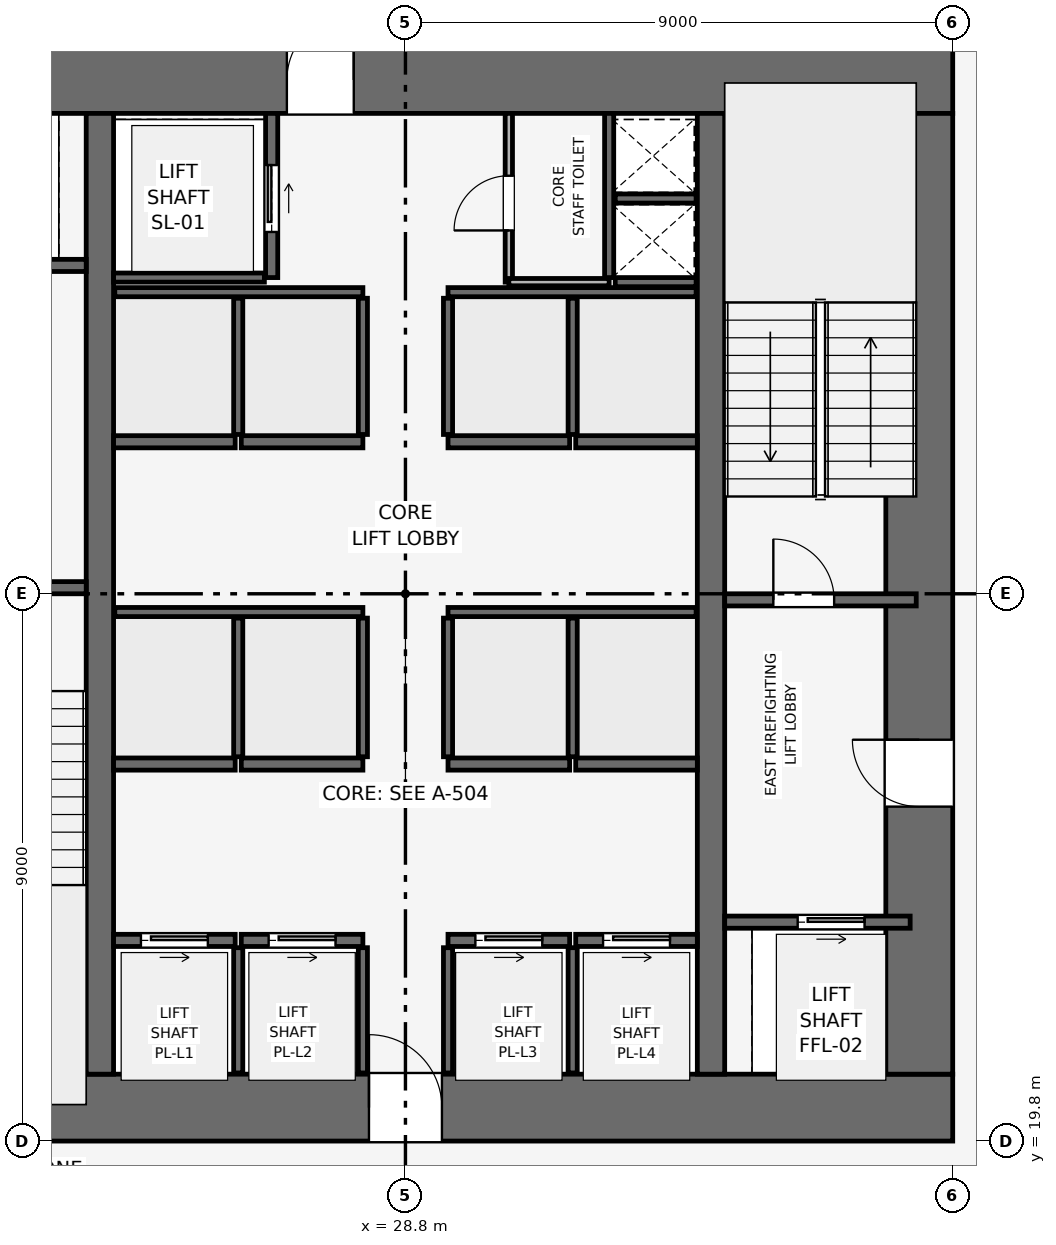
"""IFC4 building model, lengths in metres.
Left out: names, types, materials, properties, quantities, classifications, styles, units other than length and angle.
Written with IfcOpenShell. Run it as: python <this file> out.ifc"""

import sys

from ifc_helpers import new_model, si_unit, direction, frame, frame_2d, origin, place, context, subcontext, project, spatial, rectangle, extrude, element, fill, save


model = new_model("IFC4")
c1 = context("Model", 3, precision=1e-05, world=origin(), true_north=direction((0.0, 1.0)))
c2 = subcontext(c1, "Body", "Model", "MODEL_VIEW")
j1 = project(units=[si_unit("LENGTHUNIT", "METRE"), si_unit("PLANEANGLEUNIT", "RADIAN")], contexts=[c1])
p1 = place(None, origin())
s1 = spatial("IfcSite", under=j1, at=p1, CompositionType="ELEMENT")
p2 = place(p1, origin())
s2 = spatial("IfcBuilding", under=s1, at=p2, CompositionType="ELEMENT")
p3 = place(p2, frame((0.0, 0.0, 30.0)))
s3 = spatial("IfcBuildingStorey", under=s2, at=p3, CompositionType="ELEMENT", Elevation=30.0)
p4 = place(p3, frame((19.8, 20.35, 0.0), z_axis=(0.0, 0.0, 1.0), x_axis=(1.0, 0.0, 0.0)))
e1 = element("IfcWall", 1, at=p4, inside=s3, PredefinedType="SHEAR", context=c2, shape_type="SweptSolid", body=[
    extrude(rectangle(XDim=18.0, YDim=1.1, at=frame_2d((9.0, 0.0))), origin(), (0.0, 0.0, 1.0), 3.9),
])
p5 = place(p4, frame((8.4, 0.0, 0.0)))
e2 = element("IfcOpeningElement", 2, at=p5, cuts=e1, PredefinedType="OPENING", context=c2, shape_type="SweptSolid", body=[
    extrude(rectangle(XDim=1.2, YDim=2.2, at=frame_2d((0.6, 1.1))), frame((0.0, 0.56, 0.0), z_axis=(0.0, -1.0, 0.0), x_axis=(1.0, 0.0, 0.0)), (0.0, 0.0, 1.0), 1.12),
])
p6 = place(p3, frame((19.8, 37.25, 0.0), z_axis=(0.0, 0.0, 1.0), x_axis=(1.0, 0.0, 0.0)))
e3 = element("IfcWall", 3, at=p6, inside=s3, PredefinedType="SHEAR", context=c2, shape_type="SweptSolid", body=[
    extrude(rectangle(XDim=18.0, YDim=1.1, at=frame_2d((9.0, 0.0))), origin(), (0.0, 0.0, 1.0), 3.9),
])
p7 = place(p6, frame((7.05, 0.0, 0.0)))
e4 = element("IfcOpeningElement", 4, at=p7, cuts=e3, PredefinedType="OPENING", context=c2, shape_type="SweptSolid", body=[
    extrude(rectangle(XDim=1.1, YDim=2.15, at=frame_2d((0.55, 1.075))), frame((0.0, 0.56, 0.0), z_axis=(0.0, -1.0, 0.0), x_axis=(1.0, 0.0, 0.0)), (0.0, 0.0, 1.0), 1.12),
])
p8 = place(p3, frame((37.25, 20.9, 0.0), z_axis=(0.0, 0.0, 1.0), x_axis=(0.0, 1.0, 0.0)))
e5 = element("IfcWall", 5, at=p8, inside=s3, PredefinedType="SHEAR", context=c2, shape_type="SweptSolid", body=[
    extrude(rectangle(XDim=15.8, YDim=1.1, at=frame_2d((7.9, 0.0))), origin(), (0.0, 0.0, 1.0), 3.9),
])
p9 = place(p8, frame((4.4, 0.0, 0.0)))
e6 = element("IfcOpeningElement", 6, at=p9, cuts=e5, PredefinedType="OPENING", context=c2, shape_type="SweptSolid", body=[
    extrude(rectangle(XDim=1.1, YDim=2.15, at=frame_2d((0.55, 1.075))), frame((0.0, 0.56, 0.0), z_axis=(0.0, -1.0, 0.0), x_axis=(1.0, 0.0, 0.0)), (0.0, 0.0, 1.0), 1.12),
])
for number, where, z_axis, x_axis in (
    (7, (23.775, 20.9, 0.0), (0.0, 0.0, 1.0), (0.0, 1.0, 0.0)),
    (8, (33.825, 20.9, 0.0), (0.0, 0.0, 1.0), (0.0, 1.0, 0.0)),
):
    element("IfcWall", number, at=place(p3, frame(where, z_axis=z_axis, x_axis=x_axis)), inside=s3, PredefinedType="SHEAR", context=c2, shape_type="SweptSolid", body=[
        extrude(rectangle(XDim=15.8, YDim=0.45, at=frame_2d((7.9, 0.0))), origin(), (0.0, 0.0, 1.0), 3.9),
    ])
p10 = place(p3, frame((20.4, 28.9, 0.0), z_axis=(0.0, 0.0, 1.0), x_axis=(1.0, 0.0, 0.0)))
e9 = element("IfcWall", 9, at=p10, inside=s3, PredefinedType="SHEAR", context=c2, shape_type="SweptSolid", body=[
    extrude(rectangle(XDim=3.15, YDim=0.2, at=frame_2d((1.575, 0.0))), origin(), (0.0, 0.0, 1.0), 3.65),
])
p11 = place(p10, frame((0.8, 0.0, 0.0)))
e10 = element("IfcOpeningElement", 10, at=p11, cuts=e9, PredefinedType="OPENING", context=c2, shape_type="SweptSolid", body=[
    extrude(rectangle(XDim=1.0, YDim=2.1, at=frame_2d((0.5, 1.05))), frame((0.0, 0.11, 0.0), z_axis=(0.0, -1.0, 0.0), x_axis=(1.0, 0.0, 0.0)), (0.0, 0.0, 1.0), 0.22),
])
p12 = place(p3, frame((34.05, 28.7, 0.0), z_axis=(0.0, 0.0, 1.0), x_axis=(1.0, 0.0, 0.0)))
e11 = element("IfcWall", 11, at=p12, inside=s3, PredefinedType="SHEAR", context=c2, shape_type="SweptSolid", body=[
    extrude(rectangle(XDim=3.15, YDim=0.2, at=frame_2d((1.575, 0.0))), origin(), (0.0, 0.0, 1.0), 3.65),
])
p13 = place(p12, frame((0.8, 0.0, 0.0)))
e12 = element("IfcOpeningElement", 12, at=p13, cuts=e11, PredefinedType="OPENING", context=c2, shape_type="SweptSolid", body=[
    extrude(rectangle(XDim=1.0, YDim=2.1, at=frame_2d((0.5, 1.05))), frame((0.0, 0.11, 0.0), z_axis=(0.0, -1.0, 0.0), x_axis=(1.0, 0.0, 0.0)), (0.0, 0.0, 1.0), 0.22),
])
p14 = place(p3, frame((32.15, 34.0, 0.0), z_axis=(0.0, 0.0, 1.0), x_axis=(0.0, 1.0, 0.0)))
e13 = element("IfcWall", 13, at=p14, inside=s3, PredefinedType="SHEAR", context=c2, shape_type="SweptSolid", body=[
    extrude(rectangle(XDim=2.7, YDim=0.15, at=frame_2d((1.35, 0.0))), origin(), (0.0, 0.0, 1.0), 3.65),
])
for number, where, z_axis, x_axis in (
    (14, (32.25, 33.925, 0.0), (0.0, 0.0, 1.0), (1.0, 0.0, 0.0)),
    (15, (32.25, 35.3, 0.0), (0.0, 0.0, 1.0), (1.0, 0.0, 0.0)),
):
    element("IfcWall", number, at=place(p3, frame(where, z_axis=z_axis, x_axis=x_axis)), inside=s3, PredefinedType="SHEAR", context=c2, shape_type="SweptSolid", body=[
        extrude(rectangle(XDim=1.33, YDim=0.15, at=frame_2d((0.665, 0.0))), origin(), (0.0, 0.0, 1.0), 3.65),
    ])
p15 = place(p3, frame((20.5, 34.2, 0.0), z_axis=(0.0, 0.0, 1.0), x_axis=(1.0, 0.0, 0.0)))
e16 = element("IfcWall", 16, at=p15, inside=s3, PredefinedType="SHEAR", context=c2, shape_type="SweptSolid", body=[
    extrude(rectangle(XDim=3.05, YDim=0.2, at=frame_2d((1.525, 0.0))), origin(), (0.0, 0.0, 1.0), 3.65),
])
p16 = place(p15, frame((0.75, 0.0, 0.0)))
e17 = element("IfcOpeningElement", 17, at=p16, cuts=e16, PredefinedType="OPENING", context=c2, shape_type="SweptSolid", body=[
    extrude(rectangle(XDim=1.1, YDim=2.15, at=frame_2d((0.55, 1.075))), frame((0.0, 0.11, 0.0), z_axis=(0.0, -1.0, 0.0), x_axis=(1.0, 0.0, 0.0)), (0.0, 0.0, 1.0), 0.22),
])
p17 = place(p3, frame((34.05, 23.4, 0.0), z_axis=(0.0, 0.0, 1.0), x_axis=(1.0, 0.0, 0.0)))
e18 = element("IfcWall", 18, at=p17, inside=s3, PredefinedType="SHEAR", context=c2, shape_type="SweptSolid", body=[
    extrude(rectangle(XDim=3.05, YDim=0.2, at=frame_2d((1.525, 0.0))), origin(), (0.0, 0.0, 1.0), 3.65),
])
p18 = place(p17, frame((1.2, 0.0, 0.0)))
e19 = element("IfcOpeningElement", 19, at=p18, cuts=e18, PredefinedType="OPENING", context=c2, shape_type="SweptSolid", body=[
    extrude(rectangle(XDim=1.1, YDim=2.15, at=frame_2d((0.55, 1.075))), frame((0.0, 0.11, 0.0), z_axis=(0.0, -1.0, 0.0), x_axis=(1.0, 0.0, 0.0)), (0.0, 0.0, 1.0), 0.22),
])
p19 = place(p3, frame((26.6, 34.0, 0.0), z_axis=(0.0, 0.0, 1.0), x_axis=(0.0, 1.0, 0.0)))
e20 = element("IfcWall", 20, at=p19, inside=s3, PredefinedType="SHEAR", context=c2, shape_type="SweptSolid", body=[
    extrude(rectangle(XDim=2.7, YDim=0.2, at=frame_2d((1.35, 0.0))), origin(), (0.0, 0.0, 1.0), 3.65),
])
p20 = place(p19, frame((0.75, 0.0, 0.0)))
e21 = element("IfcOpeningElement", 21, at=p20, cuts=e20, PredefinedType="OPENING", context=c2, shape_type="SweptSolid", body=[
    extrude(rectangle(XDim=1.1, YDim=2.15, at=frame_2d((0.55, 1.075))), frame((0.0, 0.11, 0.0), z_axis=(0.0, -1.0, 0.0), x_axis=(1.0, 0.0, 0.0)), (0.0, 0.0, 1.0), 0.22),
])
p21 = place(p3, frame((24.0, 34.0, 0.0), z_axis=(0.0, 0.0, 1.0), x_axis=(1.0, 0.0, 0.0)))
e22 = element("IfcWall", 22, at=p21, inside=s3, PredefinedType="SHEAR", context=c2, shape_type="SweptSolid", body=[
    extrude(rectangle(XDim=2.48, YDim=0.15, at=frame_2d((1.24, 0.0))), origin(), (0.0, 0.0, 1.0), 3.65),
])
p22 = place(p3, frame((24.0, 23.1, 0.0), z_axis=(0.0, 0.0, 1.0), x_axis=(1.0, 0.0, 0.0)))
e23 = element("IfcWall", 23, at=p22, inside=s3, PredefinedType="SHEAR", context=c2, shape_type="SweptSolid", body=[
    extrude(rectangle(XDim=2.0, YDim=0.2, at=frame_2d((1.0, 0.0))), origin(), (0.0, 0.0, 1.0), 3.65),
])
p23 = place(p22, frame((0.45, 0.0, 0.0)))
e24 = element("IfcOpeningElement", 24, at=p23, cuts=e23, PredefinedType="OPENING", context=c2, shape_type="SweptSolid", body=[
    extrude(rectangle(XDim=1.1, YDim=2.15, at=frame_2d((0.55, 1.075))), frame((0.0, 0.11, 0.0), z_axis=(0.0, -1.0, 0.0), x_axis=(1.0, 0.0, 0.0)), (0.0, 0.0, 1.0), 0.22),
])
p24 = place(p3, frame((26.1, 23.1, 0.0), z_axis=(0.0, 0.0, 1.0), x_axis=(1.0, 0.0, 0.0)))
e25 = element("IfcWall", 25, at=p24, inside=s3, PredefinedType="SHEAR", context=c2, shape_type="SweptSolid", body=[
    extrude(rectangle(XDim=2.0, YDim=0.2, at=frame_2d((1.0, 0.0))), origin(), (0.0, 0.0, 1.0), 3.65),
])
p25 = place(p24, frame((0.45, 0.0, 0.0)))
e26 = element("IfcOpeningElement", 26, at=p25, cuts=e25, PredefinedType="OPENING", context=c2, shape_type="SweptSolid", body=[
    extrude(rectangle(XDim=1.1, YDim=2.15, at=frame_2d((0.55, 1.075))), frame((0.0, 0.11, 0.0), z_axis=(0.0, -1.0, 0.0), x_axis=(1.0, 0.0, 0.0)), (0.0, 0.0, 1.0), 0.22),
])
p26 = place(p3, frame((29.5, 23.1, 0.0), z_axis=(0.0, 0.0, 1.0), x_axis=(1.0, 0.0, 0.0)))
e27 = element("IfcWall", 27, at=p26, inside=s3, PredefinedType="SHEAR", context=c2, shape_type="SweptSolid", body=[
    extrude(rectangle(XDim=2.0, YDim=0.2, at=frame_2d((1.0, 0.0))), origin(), (0.0, 0.0, 1.0), 3.65),
])
p27 = place(p26, frame((0.45, 0.0, 0.0)))
e28 = element("IfcOpeningElement", 28, at=p27, cuts=e27, PredefinedType="OPENING", context=c2, shape_type="SweptSolid", body=[
    extrude(rectangle(XDim=1.1, YDim=2.15, at=frame_2d((0.55, 1.075))), frame((0.0, 0.11, 0.0), z_axis=(0.0, -1.0, 0.0), x_axis=(1.0, 0.0, 0.0)), (0.0, 0.0, 1.0), 0.22),
])
p28 = place(p3, frame((31.6, 23.1, 0.0), z_axis=(0.0, 0.0, 1.0), x_axis=(1.0, 0.0, 0.0)))
e29 = element("IfcWall", 29, at=p28, inside=s3, PredefinedType="SHEAR", context=c2, shape_type="SweptSolid", body=[
    extrude(rectangle(XDim=2.0, YDim=0.2, at=frame_2d((1.0, 0.0))), origin(), (0.0, 0.0, 1.0), 3.65),
])
p29 = place(p28, frame((0.45, 0.0, 0.0)))
e30 = element("IfcOpeningElement", 30, at=p29, cuts=e29, PredefinedType="OPENING", context=c2, shape_type="SweptSolid", body=[
    extrude(rectangle(XDim=1.1, YDim=2.15, at=frame_2d((0.55, 1.075))), frame((0.0, 0.11, 0.0), z_axis=(0.0, -1.0, 0.0), x_axis=(1.0, 0.0, 0.0)), (0.0, 0.0, 1.0), 0.22),
])
for number, where, z_axis, x_axis in (
    (31, (24.0, 26.0, 0.0), (0.0, 0.0, 1.0), (1.0, 0.0, 0.0)),
    (32, (26.1, 26.0, 0.0), (0.0, 0.0, 1.0), (1.0, 0.0, 0.0)),
    (33, (29.5, 26.0, 0.0), (0.0, 0.0, 1.0), (1.0, 0.0, 0.0)),
    (34, (31.6, 26.0, 0.0), (0.0, 0.0, 1.0), (1.0, 0.0, 0.0)),
    (35, (24.0, 31.3, 0.0), (0.0, 0.0, 1.0), (1.0, 0.0, 0.0)),
    (36, (26.1, 31.3, 0.0), (0.0, 0.0, 1.0), (1.0, 0.0, 0.0)),
    (37, (29.5, 31.3, 0.0), (0.0, 0.0, 1.0), (1.0, 0.0, 0.0)),
    (38, (31.6, 31.3, 0.0), (0.0, 0.0, 1.0), (1.0, 0.0, 0.0)),
):
    element("IfcWall", number, at=place(p3, frame(where, z_axis=z_axis, x_axis=x_axis)), inside=s3, PredefinedType="SHEAR", context=c2, shape_type="SweptSolid", body=[
        extrude(rectangle(XDim=2.0, YDim=0.2, at=frame_2d((1.0, 0.0))), origin(), (0.0, 0.0, 1.0), 3.65),
    ])
for number, where, z_axis, x_axis in (
    (39, (26.05, 20.92, 0.0), (0.0, 0.0, 1.0), (0.0, 1.0, 0.0)),
    (40, (28.1, 20.92, 0.0), (0.0, 0.0, 1.0), (0.0, 1.0, 0.0)),
    (41, (29.5, 20.92, 0.0), (0.0, 0.0, 1.0), (0.0, 1.0, 0.0)),
    (42, (31.55, 20.92, 0.0), (0.0, 0.0, 1.0), (0.0, 1.0, 0.0)),
):
    element("IfcWall", number, at=place(p3, frame(where, z_axis=z_axis, x_axis=x_axis)), inside=s3, PredefinedType="SHEAR", context=c2, shape_type="SweptSolid", body=[
        extrude(rectangle(XDim=2.06, YDim=0.15, at=frame_2d((1.03, 0.0))), origin(), (0.0, 0.0, 1.0), 3.65),
    ])
for number, where, z_axis, x_axis in (
    (43, (24.02, 28.5, 0.0), (0.0, 0.0, 1.0), (1.0, 0.0, 0.0)),
    (44, (29.5, 28.5, 0.0), (0.0, 0.0, 1.0), (1.0, 0.0, 0.0)),
):
    element("IfcWall", number, at=place(p3, frame(where, z_axis=z_axis, x_axis=x_axis)), inside=s3, PredefinedType="SHEAR", context=c2, shape_type="SweptSolid", body=[
        extrude(rectangle(XDim=4.08, YDim=0.15, at=frame_2d((2.04, 0.0))), origin(), (0.0, 0.0, 1.0), 3.65),
    ])
for number, where, z_axis, x_axis in (
    (45, (26.05, 26.12, 0.0), (0.0, 0.0, 1.0), (0.0, 1.0, 0.0)),
    (46, (28.1, 26.12, 0.0), (0.0, 0.0, 1.0), (0.0, 1.0, 0.0)),
    (47, (29.5, 26.12, 0.0), (0.0, 0.0, 1.0), (0.0, 1.0, 0.0)),
    (48, (31.55, 26.12, 0.0), (0.0, 0.0, 1.0), (0.0, 1.0, 0.0)),
):
    element("IfcWall", number, at=place(p3, frame(where, z_axis=z_axis, x_axis=x_axis)), inside=s3, PredefinedType="SHEAR", context=c2, shape_type="SweptSolid", body=[
        extrude(rectangle(XDim=2.28, YDim=0.15, at=frame_2d((1.14, 0.0))), origin(), (0.0, 0.0, 1.0), 3.65),
    ])
for number, where, z_axis, x_axis in (
    (49, (24.02, 33.76, 0.0), (0.0, 0.0, 1.0), (1.0, 0.0, 0.0)),
    (50, (29.5, 33.76, 0.0), (0.0, 0.0, 1.0), (1.0, 0.0, 0.0)),
):
    element("IfcWall", number, at=place(p3, frame(where, z_axis=z_axis, x_axis=x_axis)), inside=s3, PredefinedType="SHEAR", context=c2, shape_type="SweptSolid", body=[
        extrude(rectangle(XDim=4.08, YDim=0.15, at=frame_2d((2.04, 0.0))), origin(), (0.0, 0.0, 1.0), 3.65),
    ])
for number, where, z_axis, x_axis in (
    (51, (26.05, 31.42, 0.0), (0.0, 0.0, 1.0), (0.0, 1.0, 0.0)),
    (52, (28.1, 31.42, 0.0), (0.0, 0.0, 1.0), (0.0, 1.0, 0.0)),
    (53, (29.5, 31.42, 0.0), (0.0, 0.0, 1.0), (0.0, 1.0, 0.0)),
    (54, (31.55, 31.42, 0.0), (0.0, 0.0, 1.0), (0.0, 1.0, 0.0)),
):
    element("IfcWall", number, at=place(p3, frame(where, z_axis=z_axis, x_axis=x_axis)), inside=s3, PredefinedType="SHEAR", context=c2, shape_type="SweptSolid", body=[
        extrude(rectangle(XDim=2.24, YDim=0.15, at=frame_2d((1.12, 0.0))), origin(), (0.0, 0.0, 1.0), 3.65),
    ])
p30 = place(p3, frame((30.5, 33.925, 0.0), z_axis=(0.0, 0.0, 1.0), x_axis=(0.0, 1.0, 0.0)))
e55 = element("IfcWall", 55, at=p30, inside=s3, PredefinedType="PARTITIONING", context=c2, shape_type="SweptSolid", body=[
    extrude(rectangle(XDim=2.775, YDim=0.12, at=frame_2d((1.387, 0.0))), origin(), (0.0, 0.0, 1.0), 3.65),
])
p31 = place(p30, frame((0.85, 0.0, 0.0)))
e56 = element("IfcOpeningElement", 56, at=p31, cuts=e55, PredefinedType="OPENING", context=c2, shape_type="SweptSolid", body=[
    extrude(rectangle(XDim=0.9, YDim=2.1, at=frame_2d((0.45, 1.05))), frame((0.0, 0.07, 0.0), z_axis=(0.0, -1.0, 0.0), x_axis=(1.0, 0.0, 0.0)), (0.0, 0.0, 1.0), 0.14),
])
p32 = place(p3, frame((30.5, 33.925, 0.0), z_axis=(0.0, 0.0, 1.0), x_axis=(1.0, 0.0, 0.0)))
e57 = element("IfcWall", 57, at=p32, inside=s3, PredefinedType="PARTITIONING", context=c2, shape_type="SweptSolid", body=[
    extrude(rectangle(XDim=1.65, YDim=0.12, at=frame_2d((0.825, 0.0))), origin(), (0.0, 0.0, 1.0), 3.65),
])
p33 = place(p13, origin())
e58 = element("IfcDoor", 58, at=p33, inside=s3, OperationType="SINGLE_SWING_LEFT", PredefinedType="DOOR", context=c2, shape_type="SweptSolid", body=[
    extrude(rectangle(XDim=1.0, YDim=2.1, at=frame_2d((0.5, 1.05))), frame((0.0, 0.025, 0.0), z_axis=(0.0, -1.0, 0.0), x_axis=(1.0, 0.0, 0.0)), (0.0, 0.0, 1.0), 0.05),
])
fill(e12, e58)
p34 = place(p18, origin())
e59 = element("IfcDoor", 59, at=p34, inside=s3, OperationType="SLIDING_TO_RIGHT", PredefinedType="DOOR", context=c2, shape_type="SweptSolid", body=[
    extrude(rectangle(XDim=1.1, YDim=2.15, at=frame_2d((0.55, 1.075))), frame((0.0, 0.025, 0.0), z_axis=(0.0, -1.0, 0.0), x_axis=(1.0, 0.0, 0.0)), (0.0, 0.0, 1.0), 0.05),
])
fill(e19, e59)
p35 = place(p20, origin())
e60 = element("IfcDoor", 60, at=p35, inside=s3, OperationType="SLIDING_TO_RIGHT", PredefinedType="DOOR", context=c2, shape_type="SweptSolid", body=[
    extrude(rectangle(XDim=1.1, YDim=2.15, at=frame_2d((0.55, 1.075))), frame((0.0, 0.025, 0.0), z_axis=(0.0, -1.0, 0.0), x_axis=(1.0, 0.0, 0.0)), (0.0, 0.0, 1.0), 0.05),
])
fill(e21, e60)
p36 = place(p23, origin())
e61 = element("IfcDoor", 61, at=p36, inside=s3, OperationType="SLIDING_TO_RIGHT", PredefinedType="DOOR", context=c2, shape_type="SweptSolid", body=[
    extrude(rectangle(XDim=1.1, YDim=2.15, at=frame_2d((0.55, 1.075))), frame((0.0, 0.025, 0.0), z_axis=(0.0, -1.0, 0.0), x_axis=(1.0, 0.0, 0.0)), (0.0, 0.0, 1.0), 0.05),
])
fill(e24, e61)
p37 = place(p25, origin())
e62 = element("IfcDoor", 62, at=p37, inside=s3, OperationType="SLIDING_TO_RIGHT", PredefinedType="DOOR", context=c2, shape_type="SweptSolid", body=[
    extrude(rectangle(XDim=1.1, YDim=2.15, at=frame_2d((0.55, 1.075))), frame((0.0, 0.025, 0.0), z_axis=(0.0, -1.0, 0.0), x_axis=(1.0, 0.0, 0.0)), (0.0, 0.0, 1.0), 0.05),
])
fill(e26, e62)
p38 = place(p27, origin())
e63 = element("IfcDoor", 63, at=p38, inside=s3, OperationType="SLIDING_TO_RIGHT", PredefinedType="DOOR", context=c2, shape_type="SweptSolid", body=[
    extrude(rectangle(XDim=1.1, YDim=2.15, at=frame_2d((0.55, 1.075))), frame((0.0, 0.025, 0.0), z_axis=(0.0, -1.0, 0.0), x_axis=(1.0, 0.0, 0.0)), (0.0, 0.0, 1.0), 0.05),
])
fill(e28, e63)
p39 = place(p29, origin())
e64 = element("IfcDoor", 64, at=p39, inside=s3, OperationType="SLIDING_TO_RIGHT", PredefinedType="DOOR", context=c2, shape_type="SweptSolid", body=[
    extrude(rectangle(XDim=1.1, YDim=2.15, at=frame_2d((0.55, 1.075))), frame((0.0, 0.025, 0.0), z_axis=(0.0, -1.0, 0.0), x_axis=(1.0, 0.0, 0.0)), (0.0, 0.0, 1.0), 0.05),
])
fill(e30, e64)
p40 = place(p31, origin())
e65 = element("IfcDoor", 65, at=p40, inside=s3, OperationType="SINGLE_SWING_LEFT", PredefinedType="DOOR", context=c2, shape_type="SweptSolid", body=[
    extrude(rectangle(XDim=0.9, YDim=2.1, at=frame_2d((0.45, 1.05))), frame((0.0, 0.025, 0.0), z_axis=(0.0, -1.0, 0.0), x_axis=(1.0, 0.0, 0.0)), (0.0, 0.0, 1.0), 0.05),
])
fill(e56, e65)
p41 = place(p9, origin())
e66 = element("IfcDoor", 66, at=p41, inside=s3, OperationType="SINGLE_SWING_RIGHT", PredefinedType="DOOR", context=c2, shape_type="SweptSolid", body=[
    extrude(rectangle(XDim=1.1, YDim=2.15, at=frame_2d((0.55, 1.075))), frame((0.0, 0.025, 0.0), z_axis=(0.0, -1.0, 0.0), x_axis=(1.0, 0.0, 0.0)), (0.0, 0.0, 1.0), 0.05),
])
fill(e6, e66)
p42 = place(p5, origin())
e67 = element("IfcDoor", 67, at=p42, inside=s3, OperationType="SINGLE_SWING_LEFT", PredefinedType="DOOR", context=c2, shape_type="SweptSolid", body=[
    extrude(rectangle(XDim=1.2, YDim=2.2, at=frame_2d((0.6, 1.1))), frame((0.0, 0.025, 0.0), z_axis=(0.0, -1.0, 0.0), x_axis=(1.0, 0.0, 0.0)), (0.0, 0.0, 1.0), 0.05),
])
fill(e2, e67)
p43 = place(p7, origin())
e68 = element("IfcDoor", 68, at=p43, inside=s3, OperationType="SINGLE_SWING_RIGHT", PredefinedType="DOOR", context=c2, shape_type="SweptSolid", body=[
    extrude(rectangle(XDim=1.1, YDim=2.15, at=frame_2d((0.55, 1.075))), frame((0.0, 0.025, 0.0), z_axis=(0.0, -1.0, 0.0), x_axis=(1.0, 0.0, 0.0)), (0.0, 0.0, 1.0), 0.05),
])
fill(e4, e68)
save(model, sys.argv[1])
